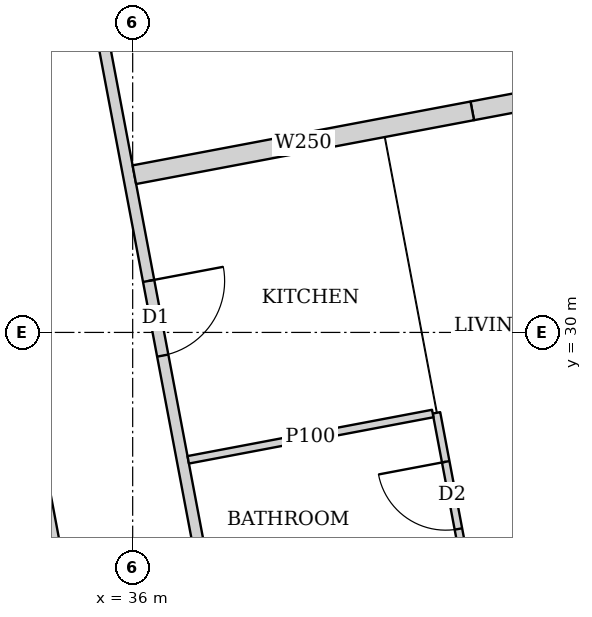
"""IFC4 building model, lengths in metres.
Left out: names, types, materials, properties, quantities, classifications, styles, units other than length and angle.
Written with IfcOpenShell. Run it as: python <this file> out.ifc"""

import sys

from ifc_helpers import new_model, si_unit, direction, frame, frame_2d, origin, place, context, subcontext, project, spatial, rectangle, extrude, element, fill, save


model = new_model("IFC4")
c1 = context("Model", 3, precision=1e-05, world=origin(), true_north=direction((0.0, 1.0)))
c2 = subcontext(c1, "Body", "Model", "MODEL_VIEW")
j1 = project(units=[si_unit("LENGTHUNIT", "METRE"), si_unit("PLANEANGLEUNIT", "RADIAN")], contexts=[c1])
p1 = place(None, origin())
s1 = spatial("IfcSite", under=j1, at=p1, CompositionType="ELEMENT")
p2 = place(p1, origin())
s2 = spatial("IfcBuilding", under=s1, at=p2, CompositionType="ELEMENT")
p3 = place(p2, frame((0.0, 0.0, 100.4)))
s3 = spatial("IfcBuildingStorey", under=s2, at=p3, CompositionType="ELEMENT", Elevation=100.4)
p4 = place(p3, frame((33.382, 45.65, 0.0), z_axis=(0.0, 0.0, 1.0), x_axis=(0.185593544777, -0.982626600565, 0.0)))
e1 = element("IfcWall", 1, at=p4, inside=s3, PredefinedType="SOLIDWALL", context=c2, shape_type="SweptSolid", body=[
    extrude(rectangle(XDim=47.118, YDim=0.15, at=frame_2d((23.559, 0.0))), origin(), (0.0, 0.0, 1.0), 2.2),
])
p5 = place(p4, frame((10.662, 0.0, 0.0)))
e2 = element("IfcOpeningElement", 2, at=p5, cuts=e1, PredefinedType="OPENING", context=c2, shape_type="SweptSolid", body=[
    extrude(rectangle(XDim=1.0, YDim=2.1, at=frame_2d((0.5, 1.05))), frame((0.0, 0.085, 0.0), z_axis=(0.0, -1.0, 0.0), x_axis=(1.0, 0.0, 0.0)), (0.0, 0.0, 1.0), 0.17),
])
p6 = place(p4, frame((15.237, 0.0, 0.0)))
e3 = element("IfcOpeningElement", 3, at=p6, cuts=e1, PredefinedType="OPENING", context=c2, shape_type="SweptSolid", body=[
    extrude(rectangle(XDim=1.0, YDim=2.1, at=frame_2d((0.5, 1.05))), frame((0.0, 0.085, 0.0), z_axis=(0.0, -1.0, 0.0), x_axis=(1.0, 0.0, 0.0)), (0.0, 0.0, 1.0), 0.17),
])
p7 = place(p4, frame((27.341, 0.0, 0.0)))
e4 = element("IfcOpeningElement", 4, at=p7, cuts=e1, PredefinedType="OPENING", context=c2, shape_type="SweptSolid", body=[
    extrude(rectangle(XDim=1.0, YDim=2.1, at=frame_2d((0.5, 1.05))), frame((0.0, 0.085, 0.0), z_axis=(0.0, -1.0, 0.0), x_axis=(1.0, 0.0, 0.0)), (0.0, 0.0, 1.0), 0.17),
])
p8 = place(p4, frame((33.833, 0.0, 0.0)))
e5 = element("IfcOpeningElement", 5, at=p8, cuts=e1, PredefinedType="OPENING", context=c2, shape_type="SweptSolid", body=[
    extrude(rectangle(XDim=1.0, YDim=2.1, at=frame_2d((0.5, 1.05))), frame((0.0, 0.085, 0.0), z_axis=(0.0, -1.0, 0.0), x_axis=(1.0, 0.0, 0.0)), (0.0, 0.0, 1.0), 0.17),
])
p9 = place(p3, frame((39.997, 28.942, 0.0), z_axis=(0.0, 0.0, 1.0), x_axis=(0.185686318797, -0.982609073341, 0.0)))
e6 = element("IfcWall", 6, at=p9, inside=s3, PredefinedType="PARTITIONING", context=c2, shape_type="SweptSolid", body=[
    extrude(rectangle(XDim=7.508, YDim=0.1, at=frame_2d((3.754, 0.0))), origin(), (0.0, 0.0, 1.0), 2.5),
])
p10 = place(p9, frame((0.655, 0.0, 0.0)))
e7 = element("IfcOpeningElement", 7, at=p10, cuts=e6, PredefinedType="OPENING", context=c2, shape_type="SweptSolid", body=[
    extrude(rectangle(XDim=0.9, YDim=2.1, at=frame_2d((0.45, 1.05))), frame((0.0, 0.06, 0.0), z_axis=(0.0, -1.0, 0.0), x_axis=(1.0, 0.0, 0.0)), (0.0, 0.0, 1.0), 0.12),
])
p11 = place(p9, frame((4.166, 0.0, 0.0)))
e8 = element("IfcOpeningElement", 8, at=p11, cuts=e6, PredefinedType="OPENING", context=c2, shape_type="SweptSolid", body=[
    extrude(rectangle(XDim=0.9, YDim=2.1, at=frame_2d((0.45, 1.05))), frame((0.0, 0.06, 0.0), z_axis=(0.0, -1.0, 0.0), x_axis=(1.0, 0.0, 0.0)), (0.0, 0.0, 1.0), 0.12),
])
p12 = place(p9, frame((2.563, 0.0, 0.0)))
e9 = element("IfcOpeningElement", 9, at=p12, cuts=e6, PredefinedType="OPENING", context=c2, shape_type="SweptSolid", body=[
    extrude(rectangle(XDim=0.9, YDim=2.1, at=frame_2d((0.45, 1.05))), frame((0.0, 0.06, 0.0), z_axis=(0.0, -1.0, 0.0), x_axis=(1.0, 0.0, 0.0)), (0.0, 0.0, 1.0), 0.12),
])
p13 = place(p9, frame((6.074, 0.0, 0.0)))
e10 = element("IfcOpeningElement", 10, at=p13, cuts=e6, PredefinedType="OPENING", context=c2, shape_type="SweptSolid", body=[
    extrude(rectangle(XDim=0.9, YDim=2.1, at=frame_2d((0.45, 1.05))), frame((0.0, 0.06, 0.0), z_axis=(0.0, -1.0, 0.0), x_axis=(1.0, 0.0, 0.0)), (0.0, 0.0, 1.0), 0.12),
])
p14 = place(p3, frame((39.948, 28.933, 0.0), z_axis=(0.0, 0.0, 1.0), x_axis=(-0.982542259571, -0.186039533857, 0.0)))
e11 = element("IfcWall", 11, at=p14, inside=s3, PredefinedType="PARTITIONING", context=c2, shape_type="SweptSolid", body=[
    extrude(rectangle(XDim=3.274, YDim=0.1, at=frame_2d((1.637, 0.0))), origin(), (0.0, 0.0, 1.0), 3.5),
])
p15 = place(p3, frame((44.693, 33.713, 0.0), z_axis=(0.0, 0.0, 1.0), x_axis=(-0.982633535512, -0.185556823879, 0.0)))
e12 = element("IfcWall", 12, at=p15, inside=s3, PredefinedType="SOLIDWALL", context=c2, shape_type="SweptSolid", body=[
    extrude(rectangle(XDim=4.3, YDim=0.25, at=frame_2d((2.15, 0.0))), origin(), (0.0, 0.0, 1.0), 2.2),
])
p16 = place(p3, frame((40.468, 32.915, 0.0), z_axis=(0.0, 0.0, 1.0), x_axis=(-0.982612837616, -0.185666398014, 0.0)))
e13 = element("IfcWall", 13, at=p16, inside=s3, PredefinedType="SOLIDWALL", context=c2, shape_type="SweptSolid", body=[
    extrude(rectangle(XDim=4.525, YDim=0.25, at=frame_2d((2.262, 0.0))), origin(), (0.0, 0.0, 1.0), 3.5),
])
p17 = place(p3, frame((38.202, 10.163, 0.0), z_axis=(0.0, 0.0, 1.0), x_axis=(-0.185610321132, 0.982623431783, 0.0)))
e14 = element("IfcWall", 14, at=p17, inside=s3, PredefinedType="PARTITIONING", context=c2, shape_type="SweptSolid", body=[
    extrude(rectangle(XDim=25.111, YDim=0.125, at=frame_2d((12.556, 0.0))), origin(), (0.0, 0.0, 1.0), 2.5),
])
p18 = place(p17, frame((0.708, 0.0, 0.0)))
e15 = element("IfcOpeningElement", 15, at=p18, cuts=e14, PredefinedType="OPENING", context=c2, shape_type="SweptSolid", body=[
    extrude(rectangle(XDim=1.0, YDim=2.1, at=frame_2d((0.5, 1.05))), frame((0.0, 0.073, 0.0), z_axis=(0.0, -1.0, 0.0), x_axis=(1.0, 0.0, 0.0)), (0.0, 0.0, 1.0), 0.145),
])
p19 = place(p17, frame((6.0, 0.0, 0.0)))
e16 = element("IfcOpeningElement", 16, at=p19, cuts=e14, PredefinedType="OPENING", context=c2, shape_type="SweptSolid", body=[
    extrude(rectangle(XDim=1.0, YDim=2.1, at=frame_2d((0.5, 1.05))), frame((0.0, 0.073, 0.0), z_axis=(0.0, -1.0, 0.0), x_axis=(1.0, 0.0, 0.0)), (0.0, 0.0, 1.0), 0.145),
])
p20 = place(p17, frame((13.378, 0.0, 0.0)))
e17 = element("IfcOpeningElement", 17, at=p20, cuts=e14, PredefinedType="OPENING", context=c2, shape_type="SweptSolid", body=[
    extrude(rectangle(XDim=1.0, YDim=2.1, at=frame_2d((0.5, 1.05))), frame((0.0, 0.073, 0.0), z_axis=(0.0, -1.0, 0.0), x_axis=(1.0, 0.0, 0.0)), (0.0, 0.0, 1.0), 0.145),
])
p21 = place(p17, frame((21.25, 0.0, 0.0)))
e18 = element("IfcOpeningElement", 18, at=p21, cuts=e14, PredefinedType="OPENING", context=c2, shape_type="SweptSolid", body=[
    extrude(rectangle(XDim=1.0, YDim=2.1, at=frame_2d((0.5, 1.05))), frame((0.0, 0.073, 0.0), z_axis=(0.0, -1.0, 0.0), x_axis=(1.0, 0.0, 0.0)), (0.0, 0.0, 1.0), 0.145),
])
p22 = place(p10, origin())
e19 = element("IfcDoor", 19, at=p22, inside=s3, OperationType="SINGLE_SWING_RIGHT", PredefinedType="DOOR", context=c2, shape_type="SweptSolid", body=[
    extrude(rectangle(XDim=0.9, YDim=2.1, at=frame_2d((0.45, 1.05))), frame((0.0, 0.025, 0.0), z_axis=(0.0, -1.0, 0.0), x_axis=(1.0, 0.0, 0.0)), (0.0, 0.0, 1.0), 0.05),
])
fill(e7, e19)
p23 = place(p6, origin())
e20 = element("IfcDoor", 20, at=p23, inside=s3, OperationType="SINGLE_SWING_LEFT", PredefinedType="DOOR", context=c2, shape_type="SweptSolid", body=[
    extrude(rectangle(XDim=1.0, YDim=2.1, at=frame_2d((0.5, 1.05))), frame((0.0, 0.025, 0.0), z_axis=(0.0, -1.0, 0.0), x_axis=(1.0, 0.0, 0.0)), (0.0, 0.0, 1.0), 0.05),
])
fill(e3, e20)
save(model, sys.argv[1])
